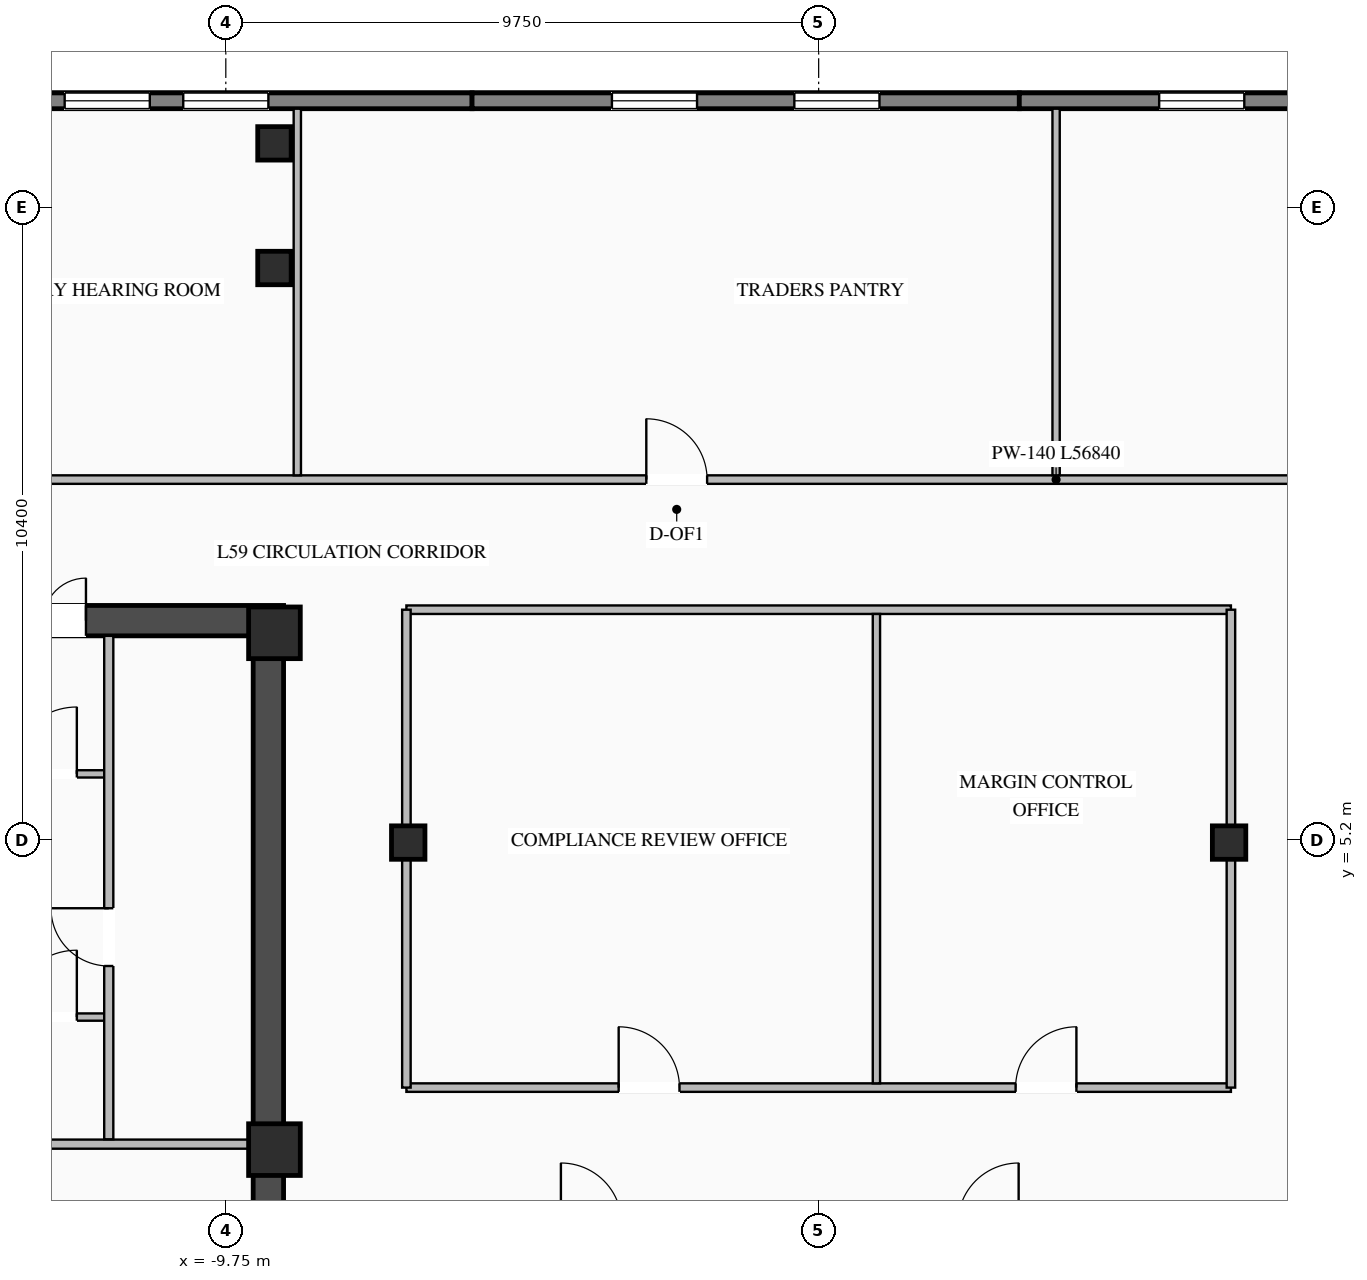
"""IFC4 building model, lengths in metres.
Left out: names, types, materials, properties, quantities, classifications, styles, units other than length and angle.
Written with IfcOpenShell. Run it as: python <this file> out.ifc"""

import sys

from ifc_helpers import new_model, si_unit, direction, frame, frame_2d, origin, origin_2d, place, context, subcontext, project, spatial, rectangle, i_section, extrude, element, fill, save


model = new_model("IFC4")
c1 = context("Model", 3, precision=1e-05, world=origin(), true_north=direction((0.0, 1.0)))
c2 = subcontext(c1, "Body", "Model", "MODEL_VIEW")
j1 = project(units=[si_unit("LENGTHUNIT", "METRE"), si_unit("PLANEANGLEUNIT", "RADIAN")], contexts=[c1])
p1 = place(None, origin())
s1 = spatial("IfcSite", under=j1, at=p1, CompositionType="ELEMENT")
p2 = place(p1, origin())
s2 = spatial("IfcBuilding", under=s1, at=p2, CompositionType="ELEMENT")
p3 = place(p2, frame((0.0, 0.0, 218.85)))
s3 = spatial("IfcBuildingStorey", under=s2, at=p3, CompositionType="ELEMENT", Elevation=218.85)
p4 = place(p3, frame((-19.05, 8.8, 0.0), z_axis=(0.0, 0.0, 1.0), x_axis=(1.0, 0.0, 0.0)))
e1 = element("IfcWall", 1, at=p4, inside=s3, PredefinedType="SHEAR", context=c2, shape_type="SweptSolid", body=[
    extrude(rectangle(XDim=10.25, YDim=0.5, at=frame_2d((5.125, 0.0))), origin(), (0.0, 0.0, 1.0), 3.27),
])
p5 = place(p4, frame((5.6, 0.0, 0.0)))
e2 = element("IfcOpeningElement", 2, at=p5, cuts=e1, PredefinedType="OPENING", context=c2, shape_type="SweptSolid", body=[
    extrude(rectangle(XDim=1.4, YDim=2.05, at=frame_2d((0.7, 1.025))), frame((0.0, 0.26, 0.0), z_axis=(0.0, -1.0, 0.0), x_axis=(1.0, 0.0, 0.0)), (0.0, 0.0, 1.0), 0.52),
])
p6 = place(p3, frame((-9.05, -8.55, 0.0), z_axis=(0.0, 0.0, 1.0), x_axis=(0.0, 1.0, 0.0)))
e3 = element("IfcWall", 3, at=p6, inside=s3, PredefinedType="SHEAR", context=c2, shape_type="SweptSolid", body=[
    extrude(rectangle(XDim=17.1, YDim=0.5, at=frame_2d((8.55, 0.0))), origin(), (0.0, 0.0, 1.0), 3.27),
])
p7 = place(p6, frame((5.3, 0.0, 0.0)))
e4 = element("IfcOpeningElement", 4, at=p7, cuts=e3, PredefinedType="OPENING", context=c2, shape_type="SweptSolid", body=[
    extrude(rectangle(XDim=1.1, YDim=2.08, at=frame_2d((0.55, 1.04))), frame((0.0, 0.26, 0.0), z_axis=(0.0, -1.0, 0.0), x_axis=(1.0, 0.0, 0.0)), (0.0, 0.0, 1.0), 0.52),
])
for number, where, z_axis, x_axis in (
    (5, (-8.95, 0.1, 0.0), (0.0, 0.0, 1.0), (1.0, 0.0, 0.0)),
    (6, (-8.95, 8.6, 0.0), (0.0, 0.0, 1.0), (1.0, 0.0, 0.0)),
):
    element("IfcColumn", number, at=place(p3, frame(where, z_axis=z_axis, x_axis=x_axis)), inside=s3, PredefinedType="COLUMN", context=c2, shape_type="SweptSolid", body=[
        extrude(rectangle(XDim=0.85, YDim=0.85, at=origin_2d()), origin(), (0.0, 0.0, 1.0), 3.45),
    ])
for number, where, z_axis, x_axis in (
    (7, (-6.75, 5.15, 0.0), (0.0, 0.0, 1.0), (1.0, 0.0, 0.0)),
    (8, (6.75, 5.15, 0.0), (0.0, 0.0, 1.0), (1.0, 0.0, 0.0)),
    (9, (-8.95, 14.6, 0.0), (0.0, 0.0, 1.0), (1.0, 0.0, 0.0)),
    (10, (-8.95, 16.65, 0.0), (0.0, 0.0, 1.0), (1.0, 0.0, 0.0)),
):
    element("IfcColumn", number, at=place(p3, frame(where, z_axis=z_axis, x_axis=x_axis)), inside=s3, PredefinedType="COLUMN", context=c2, shape_type="SweptSolid", body=[
        extrude(i_section(OverallWidth=0.55, OverallDepth=0.55, WebThickness=0.024, FlangeThickness=0.036, at=origin_2d()), origin(), (0.0, 0.0, 1.0), 3.45),
    ])
p8 = place(p3, frame((-14.7, 17.35, 0.0), z_axis=(0.0, 0.0, 1.0), x_axis=(1.0, 0.0, 0.0)))
e11 = element("IfcWall", 11, at=p8, inside=s3, PredefinedType="STANDARD", context=c2, shape_type="SweptSolid", body=[
    extrude(rectangle(XDim=9.0, YDim=0.26, at=frame_2d((4.5, 0.0))), origin(), (0.0, 0.0, 1.0), 3.25),
])
p9 = place(p8, frame((2.3, 0.0, 0.76)))
e12 = element("IfcOpeningElement", 12, at=p9, cuts=e11, PredefinedType="OPENING", context=c2, shape_type="SweptSolid", body=[
    extrude(rectangle(XDim=1.4, YDim=1.95, at=frame_2d((0.7, 0.975))), frame((0.0, 0.14, 0.0), z_axis=(0.0, -1.0, 0.0), x_axis=(1.0, 0.0, 0.0)), (0.0, 0.0, 1.0), 0.28),
])
p10 = place(p8, frame((4.25, 0.0, 0.76)))
e13 = element("IfcOpeningElement", 13, at=p10, cuts=e11, PredefinedType="OPENING", context=c2, shape_type="SweptSolid", body=[
    extrude(rectangle(XDim=1.4, YDim=1.95, at=frame_2d((0.7, 0.975))), frame((0.0, 0.14, 0.0), z_axis=(0.0, -1.0, 0.0), x_axis=(1.0, 0.0, 0.0)), (0.0, 0.0, 1.0), 0.28),
])
p11 = place(p3, frame((-5.7, 17.35, 0.0), z_axis=(0.0, 0.0, 1.0), x_axis=(1.0, 0.0, 0.0)))
e14 = element("IfcWall", 14, at=p11, inside=s3, PredefinedType="STANDARD", context=c2, shape_type="SweptSolid", body=[
    extrude(rectangle(XDim=9.0, YDim=0.26, at=frame_2d((4.5, 0.0))), origin(), (0.0, 0.0, 1.0), 3.25),
])
p12 = place(p11, frame((2.3, 0.0, 0.76)))
e15 = element("IfcOpeningElement", 15, at=p12, cuts=e14, PredefinedType="OPENING", context=c2, shape_type="SweptSolid", body=[
    extrude(rectangle(XDim=1.4, YDim=1.95, at=frame_2d((0.7, 0.975))), frame((0.0, 0.14, 0.0), z_axis=(0.0, -1.0, 0.0), x_axis=(1.0, 0.0, 0.0)), (0.0, 0.0, 1.0), 0.28),
])
p13 = place(p11, frame((5.3, 0.0, 0.76)))
e16 = element("IfcOpeningElement", 16, at=p13, cuts=e14, PredefinedType="OPENING", context=c2, shape_type="SweptSolid", body=[
    extrude(rectangle(XDim=1.4, YDim=1.95, at=frame_2d((0.7, 0.975))), frame((0.0, 0.14, 0.0), z_axis=(0.0, -1.0, 0.0), x_axis=(1.0, 0.0, 0.0)), (0.0, 0.0, 1.0), 0.28),
])
p14 = place(p3, frame((3.3, 17.35, 0.0), z_axis=(0.0, 0.0, 1.0), x_axis=(1.0, 0.0, 0.0)))
e17 = element("IfcWall", 17, at=p14, inside=s3, PredefinedType="STANDARD", context=c2, shape_type="SweptSolid", body=[
    extrude(rectangle(XDim=9.0, YDim=0.26, at=frame_2d((4.5, 0.0))), origin(), (0.0, 0.0, 1.0), 3.25),
])
p15 = place(p14, frame((2.3, 0.0, 0.76)))
e18 = element("IfcOpeningElement", 18, at=p15, cuts=e17, PredefinedType="OPENING", context=c2, shape_type="SweptSolid", body=[
    extrude(rectangle(XDim=1.4, YDim=1.95, at=frame_2d((0.7, 0.975))), frame((0.0, 0.14, 0.0), z_axis=(0.0, -1.0, 0.0), x_axis=(1.0, 0.0, 0.0)), (0.0, 0.0, 1.0), 0.28),
])
p16 = place(p14, frame((5.3, 0.0, 0.76)))
e19 = element("IfcOpeningElement", 19, at=p16, cuts=e17, PredefinedType="OPENING", context=c2, shape_type="SweptSolid", body=[
    extrude(rectangle(XDim=1.4, YDim=1.95, at=frame_2d((0.7, 0.975))), frame((0.0, 0.14, 0.0), z_axis=(0.0, -1.0, 0.0), x_axis=(1.0, 0.0, 0.0)), (0.0, 0.0, 1.0), 0.28),
])
p17 = place(p3, frame((-12.89, 0.19, 0.0), z_axis=(0.0, 0.0, 1.0), x_axis=(1.0, 0.0, 0.0)))
e20 = element("IfcWall", 20, at=p17, inside=s3, PredefinedType="STANDARD", context=c2, shape_type="SweptSolid", body=[
    extrude(rectangle(XDim=3.59, YDim=0.15, at=frame_2d((1.795, 0.0))), origin(), (0.0, 0.0, 1.0), 2.645),
])
p18 = place(p3, frame((-13.75, 2.28, 0.0), z_axis=(0.0, 0.0, 1.0), x_axis=(1.0, 0.0, 0.0)))
e21 = element("IfcWall", 21, at=p18, inside=s3, PredefinedType="STANDARD", context=c2, shape_type="SweptSolid", body=[
    extrude(rectangle(XDim=2.0, YDim=0.12, at=frame_2d((1.0, 0.0))), origin(), (0.0, 0.0, 1.0), 3.25),
])
p19 = place(p18, frame((0.45, 0.0, 0.0)))
e22 = element("IfcOpeningElement", 22, at=p19, cuts=e21, PredefinedType="OPENING", context=c2, shape_type="SweptSolid", body=[
    extrude(rectangle(XDim=1.1, YDim=2.1, at=frame_2d((0.55, 1.05))), frame((0.0, 0.07, 0.0), z_axis=(0.0, -1.0, 0.0), x_axis=(1.0, 0.0, 0.0)), (0.0, 0.0, 1.0), 0.14),
])
p20 = place(p3, frame((-13.75, 6.28, 0.0), z_axis=(0.0, 0.0, 1.0), x_axis=(1.0, 0.0, 0.0)))
e23 = element("IfcWall", 23, at=p20, inside=s3, PredefinedType="STANDARD", context=c2, shape_type="SweptSolid", body=[
    extrude(rectangle(XDim=2.0, YDim=0.12, at=frame_2d((1.0, 0.0))), origin(), (0.0, 0.0, 1.0), 3.25),
])
p21 = place(p20, frame((0.45, 0.0, 0.0)))
e24 = element("IfcOpeningElement", 24, at=p21, cuts=e23, PredefinedType="OPENING", context=c2, shape_type="SweptSolid", body=[
    extrude(rectangle(XDim=1.1, YDim=2.1, at=frame_2d((0.55, 1.05))), frame((0.0, 0.07, 0.0), z_axis=(0.0, -1.0, 0.0), x_axis=(1.0, 0.0, 0.0)), (0.0, 0.0, 1.0), 0.14),
])
p22 = place(p3, frame((-11.675, 0.27, 0.0), z_axis=(0.0, 0.0, 1.0), x_axis=(0.0, 1.0, 0.0)))
e25 = element("IfcWall", 25, at=p22, inside=s3, PredefinedType="STANDARD", context=c2, shape_type="SweptSolid", body=[
    extrude(rectangle(XDim=8.28, YDim=0.15, at=frame_2d((4.14, 0.0))), origin(), (0.0, 0.0, 1.0), 3.25),
])
p23 = place(p22, frame((2.85, 0.0, 0.0)))
e26 = element("IfcOpeningElement", 26, at=p23, cuts=e25, PredefinedType="OPENING", context=c2, shape_type="SweptSolid", body=[
    extrude(rectangle(XDim=0.95, YDim=2.05, at=frame_2d((0.475, 1.025))), frame((0.0, 0.085, 0.0), z_axis=(0.0, -1.0, 0.0), x_axis=(1.0, 0.0, 0.0)), (0.0, 0.0, 1.0), 0.17),
])
p24 = place(p3, frame((-29.62, 11.12, 0.0), z_axis=(0.0, 0.0, 1.0), x_axis=(1.0, 0.0, 0.0)))
e27 = element("IfcWall", 27, at=p24, inside=s3, PredefinedType="STANDARD", context=c2, shape_type="SweptSolid", body=[
    extrude(rectangle(XDim=56.84, YDim=0.14, at=frame_2d((28.42, 0.0))), origin(), (0.0, 0.0, 1.0), 3.25),
])
p25 = place(p24, frame((4.477, 0.0, 0.0)))
e28 = element("IfcOpeningElement", 28, at=p25, cuts=e27, PredefinedType="OPENING", context=c2, shape_type="SweptSolid", body=[
    extrude(rectangle(XDim=1.0, YDim=2.08, at=frame_2d((0.5, 1.04))), frame((0.0, 0.08, 0.0), z_axis=(0.0, -1.0, 0.0), x_axis=(1.0, 0.0, 0.0)), (0.0, 0.0, 1.0), 0.16),
])
p26 = place(p24, frame((14.874, 0.0, 0.0)))
e29 = element("IfcOpeningElement", 29, at=p26, cuts=e27, PredefinedType="OPENING", context=c2, shape_type="SweptSolid", body=[
    extrude(rectangle(XDim=1.0, YDim=2.08, at=frame_2d((0.5, 1.04))), frame((0.0, 0.08, 0.0), z_axis=(0.0, -1.0, 0.0), x_axis=(1.0, 0.0, 0.0)), (0.0, 0.0, 1.0), 0.16),
])
p27 = place(p24, frame((26.785, 0.0, 0.0)))
e30 = element("IfcOpeningElement", 30, at=p27, cuts=e27, PredefinedType="OPENING", context=c2, shape_type="SweptSolid", body=[
    extrude(rectangle(XDim=1.0, YDim=2.08, at=frame_2d((0.5, 1.04))), frame((0.0, 0.08, 0.0), z_axis=(0.0, -1.0, 0.0), x_axis=(1.0, 0.0, 0.0)), (0.0, 0.0, 1.0), 0.16),
])
p28 = place(p24, frame((39.264, 0.0, 0.0)))
e31 = element("IfcOpeningElement", 31, at=p28, cuts=e27, PredefinedType="OPENING", context=c2, shape_type="SweptSolid", body=[
    extrude(rectangle(XDim=1.0, YDim=2.08, at=frame_2d((0.5, 1.04))), frame((0.0, 0.08, 0.0), z_axis=(0.0, -1.0, 0.0), x_axis=(1.0, 0.0, 0.0)), (0.0, 0.0, 1.0), 0.16),
])
p29 = place(p24, frame((50.795, 0.0, 0.0)))
e32 = element("IfcOpeningElement", 32, at=p29, cuts=e27, PredefinedType="OPENING", context=c2, shape_type="SweptSolid", body=[
    extrude(rectangle(XDim=1.0, YDim=2.08, at=frame_2d((0.5, 1.04))), frame((0.0, 0.08, 0.0), z_axis=(0.0, -1.0, 0.0), x_axis=(1.0, 0.0, 0.0)), (0.0, 0.0, 1.0), 0.16),
])
for number, where, z_axis, x_axis in (
    (33, (-8.574, 11.19, 0.0), (0.0, 0.0, 1.0), (0.0, 1.0, 0.0)),
    (34, (3.905, 11.19, 0.0), (0.0, 0.0, 1.0), (0.0, 1.0, 0.0)),
):
    element("IfcWall", number, at=place(p3, frame(where, z_axis=z_axis, x_axis=x_axis)), inside=s3, PredefinedType="STANDARD", context=c2, shape_type="SweptSolid", body=[
        extrude(rectangle(XDim=6.03, YDim=0.12, at=frame_2d((3.015, 0.0))), origin(), (0.0, 0.0, 1.0), 3.25),
    ])
p30 = place(p3, frame((-6.78, 1.12, 0.0), z_axis=(0.0, 0.0, 1.0), x_axis=(1.0, 0.0, 0.0)))
e35 = element("IfcWall", 35, at=p30, inside=s3, PredefinedType="STANDARD", context=c2, shape_type="SweptSolid", body=[
    extrude(rectangle(XDim=13.56, YDim=0.14, at=frame_2d((6.78, 0.0))), origin(), (0.0, 0.0, 1.0), 3.25),
])
p31 = place(p30, frame((3.491, 0.0, 0.0)))
e36 = element("IfcOpeningElement", 36, at=p31, cuts=e35, PredefinedType="OPENING", context=c2, shape_type="SweptSolid", body=[
    extrude(rectangle(XDim=1.0, YDim=2.08, at=frame_2d((0.5, 1.04))), frame((0.0, 0.08, 0.0), z_axis=(0.0, -1.0, 0.0), x_axis=(1.0, 0.0, 0.0)), (0.0, 0.0, 1.0), 0.16),
])
p32 = place(p30, frame((10.019, 0.0, 0.0)))
e37 = element("IfcOpeningElement", 37, at=p32, cuts=e35, PredefinedType="OPENING", context=c2, shape_type="SweptSolid", body=[
    extrude(rectangle(XDim=1.0, YDim=2.08, at=frame_2d((0.5, 1.04))), frame((0.0, 0.08, 0.0), z_axis=(0.0, -1.0, 0.0), x_axis=(1.0, 0.0, 0.0)), (0.0, 0.0, 1.0), 0.16),
])
p33 = place(p3, frame((-6.78, 8.98, 0.0), z_axis=(0.0, 0.0, 1.0), x_axis=(1.0, 0.0, 0.0)))
e38 = element("IfcWall", 38, at=p33, inside=s3, PredefinedType="STANDARD", context=c2, shape_type="SweptSolid", body=[
    extrude(rectangle(XDim=13.56, YDim=0.14, at=frame_2d((6.78, 0.0))), origin(), (0.0, 0.0, 1.0), 3.25),
])
for number, where, z_axis, x_axis in (
    (39, (-6.78, 1.12, 0.0), (0.0, 0.0, 1.0), (0.0, 1.0, 0.0)),
    (40, (6.78, 1.12, 0.0), (0.0, 0.0, 1.0), (0.0, 1.0, 0.0)),
):
    element("IfcWall", number, at=place(p3, frame(where, z_axis=z_axis, x_axis=x_axis)), inside=s3, PredefinedType="STANDARD", context=c2, shape_type="SweptSolid", body=[
        extrude(rectangle(XDim=7.86, YDim=0.14, at=frame_2d((3.93, 0.0))), origin(), (0.0, 0.0, 1.0), 2.645),
    ])
p34 = place(p3, frame((0.95, 1.19, 0.0), z_axis=(0.0, 0.0, 1.0), x_axis=(0.0, 1.0, 0.0)))
e41 = element("IfcWall", 41, at=p34, inside=s3, PredefinedType="STANDARD", context=c2, shape_type="SweptSolid", body=[
    extrude(rectangle(XDim=7.72, YDim=0.12, at=frame_2d((3.86, 0.0))), origin(), (0.0, 0.0, 1.0), 3.25),
])
p35 = place(p9, origin())
e42 = element("IfcWindow", 42, at=p35, inside=s3, PartitioningType="SINGLE_PANEL", PredefinedType="WINDOW", context=c2, shape_type="SweptSolid", body=[
    extrude(rectangle(XDim=1.4, YDim=1.95, at=frame_2d((0.7, 0.975))), frame((0.0, 0.03, 0.0), z_axis=(0.0, -1.0, 0.0), x_axis=(1.0, 0.0, 0.0)), (0.0, 0.0, 1.0), 0.06),
])
fill(e12, e42)
p36 = place(p10, origin())
e43 = element("IfcWindow", 43, at=p36, inside=s3, PartitioningType="SINGLE_PANEL", PredefinedType="WINDOW", context=c2, shape_type="SweptSolid", body=[
    extrude(rectangle(XDim=1.4, YDim=1.95, at=frame_2d((0.7, 0.975))), frame((0.0, 0.03, 0.0), z_axis=(0.0, -1.0, 0.0), x_axis=(1.0, 0.0, 0.0)), (0.0, 0.0, 1.0), 0.06),
])
fill(e13, e43)
p37 = place(p12, origin())
e44 = element("IfcWindow", 44, at=p37, inside=s3, PartitioningType="SINGLE_PANEL", PredefinedType="WINDOW", context=c2, shape_type="SweptSolid", body=[
    extrude(rectangle(XDim=1.4, YDim=1.95, at=frame_2d((0.7, 0.975))), frame((0.0, 0.03, 0.0), z_axis=(0.0, -1.0, 0.0), x_axis=(1.0, 0.0, 0.0)), (0.0, 0.0, 1.0), 0.06),
])
fill(e15, e44)
p38 = place(p13, origin())
e45 = element("IfcWindow", 45, at=p38, inside=s3, PartitioningType="SINGLE_PANEL", PredefinedType="WINDOW", context=c2, shape_type="SweptSolid", body=[
    extrude(rectangle(XDim=1.4, YDim=1.95, at=frame_2d((0.7, 0.975))), frame((0.0, 0.03, 0.0), z_axis=(0.0, -1.0, 0.0), x_axis=(1.0, 0.0, 0.0)), (0.0, 0.0, 1.0), 0.06),
])
fill(e16, e45)
p39 = place(p15, origin())
e46 = element("IfcWindow", 46, at=p39, inside=s3, PartitioningType="SINGLE_PANEL", PredefinedType="WINDOW", context=c2, shape_type="SweptSolid", body=[
    extrude(rectangle(XDim=1.4, YDim=1.95, at=frame_2d((0.7, 0.975))), frame((0.0, 0.03, 0.0), z_axis=(0.0, -1.0, 0.0), x_axis=(1.0, 0.0, 0.0)), (0.0, 0.0, 1.0), 0.06),
])
fill(e18, e46)
p40 = place(p19, origin())
e47 = element("IfcDoor", 47, at=p40, inside=s3, OperationType="SINGLE_SWING_RIGHT", PredefinedType="DOOR", context=c2, shape_type="SweptSolid", body=[
    extrude(rectangle(XDim=1.1, YDim=2.1, at=frame_2d((0.55, 1.05))), frame((0.0, 0.025, 0.0), z_axis=(0.0, -1.0, 0.0), x_axis=(1.0, 0.0, 0.0)), (0.0, 0.0, 1.0), 0.05),
])
fill(e22, e47)
p41 = place(p21, origin())
e48 = element("IfcDoor", 48, at=p41, inside=s3, OperationType="SINGLE_SWING_RIGHT", PredefinedType="DOOR", context=c2, shape_type="SweptSolid", body=[
    extrude(rectangle(XDim=1.1, YDim=2.1, at=frame_2d((0.55, 1.05))), frame((0.0, 0.025, 0.0), z_axis=(0.0, -1.0, 0.0), x_axis=(1.0, 0.0, 0.0)), (0.0, 0.0, 1.0), 0.05),
])
fill(e24, e48)
p42 = place(p5, origin())
e49 = element("IfcDoor", 49, at=p42, inside=s3, OperationType="DOUBLE_DOOR_SINGLE_SWING", PredefinedType="DOOR", context=c2, shape_type="SweptSolid", body=[
    extrude(rectangle(XDim=1.4, YDim=2.05, at=frame_2d((0.7, 1.025))), frame((0.0, 0.195, 0.0), z_axis=(0.0, -1.0, 0.0), x_axis=(1.0, 0.0, 0.0)), (0.0, 0.0, 1.0), 0.05),
])
fill(e2, e49)
p43 = place(p23, origin())
e50 = element("IfcDoor", 50, at=p43, inside=s3, OperationType="SINGLE_SWING_RIGHT", PredefinedType="DOOR", context=c2, shape_type="SweptSolid", body=[
    extrude(rectangle(XDim=0.95, YDim=2.05, at=frame_2d((0.475, 1.025))), frame((0.0, 0.025, 0.0), z_axis=(0.0, -1.0, 0.0), x_axis=(1.0, 0.0, 0.0)), (0.0, 0.0, 1.0), 0.05),
])
fill(e26, e50)
p44 = place(p27, origin())
e51 = element("IfcDoor", 51, at=p44, inside=s3, OperationType="SINGLE_SWING_LEFT", PredefinedType="DOOR", context=c2, shape_type="SweptSolid", body=[
    extrude(rectangle(XDim=1.0, YDim=2.08, at=frame_2d((0.5, 1.04))), frame((0.0, 0.025, 0.0), z_axis=(0.0, -1.0, 0.0), x_axis=(1.0, 0.0, 0.0)), (0.0, 0.0, 1.0), 0.05),
])
fill(e30, e51)
p45 = place(p31, origin())
e52 = element("IfcDoor", 52, at=p45, inside=s3, OperationType="SINGLE_SWING_LEFT", PredefinedType="DOOR", context=c2, shape_type="SweptSolid", body=[
    extrude(rectangle(XDim=1.0, YDim=2.08, at=frame_2d((0.5, 1.04))), frame((0.0, 0.025, 0.0), z_axis=(0.0, -1.0, 0.0), x_axis=(1.0, 0.0, 0.0)), (0.0, 0.0, 1.0), 0.05),
])
fill(e36, e52)
p46 = place(p32, origin())
e53 = element("IfcDoor", 53, at=p46, inside=s3, OperationType="SINGLE_SWING_RIGHT", PredefinedType="DOOR", context=c2, shape_type="SweptSolid", body=[
    extrude(rectangle(XDim=1.0, YDim=2.08, at=frame_2d((0.5, 1.04))), frame((0.0, 0.025, 0.0), z_axis=(0.0, -1.0, 0.0), x_axis=(1.0, 0.0, 0.0)), (0.0, 0.0, 1.0), 0.05),
])
fill(e37, e53)
save(model, sys.argv[1])
